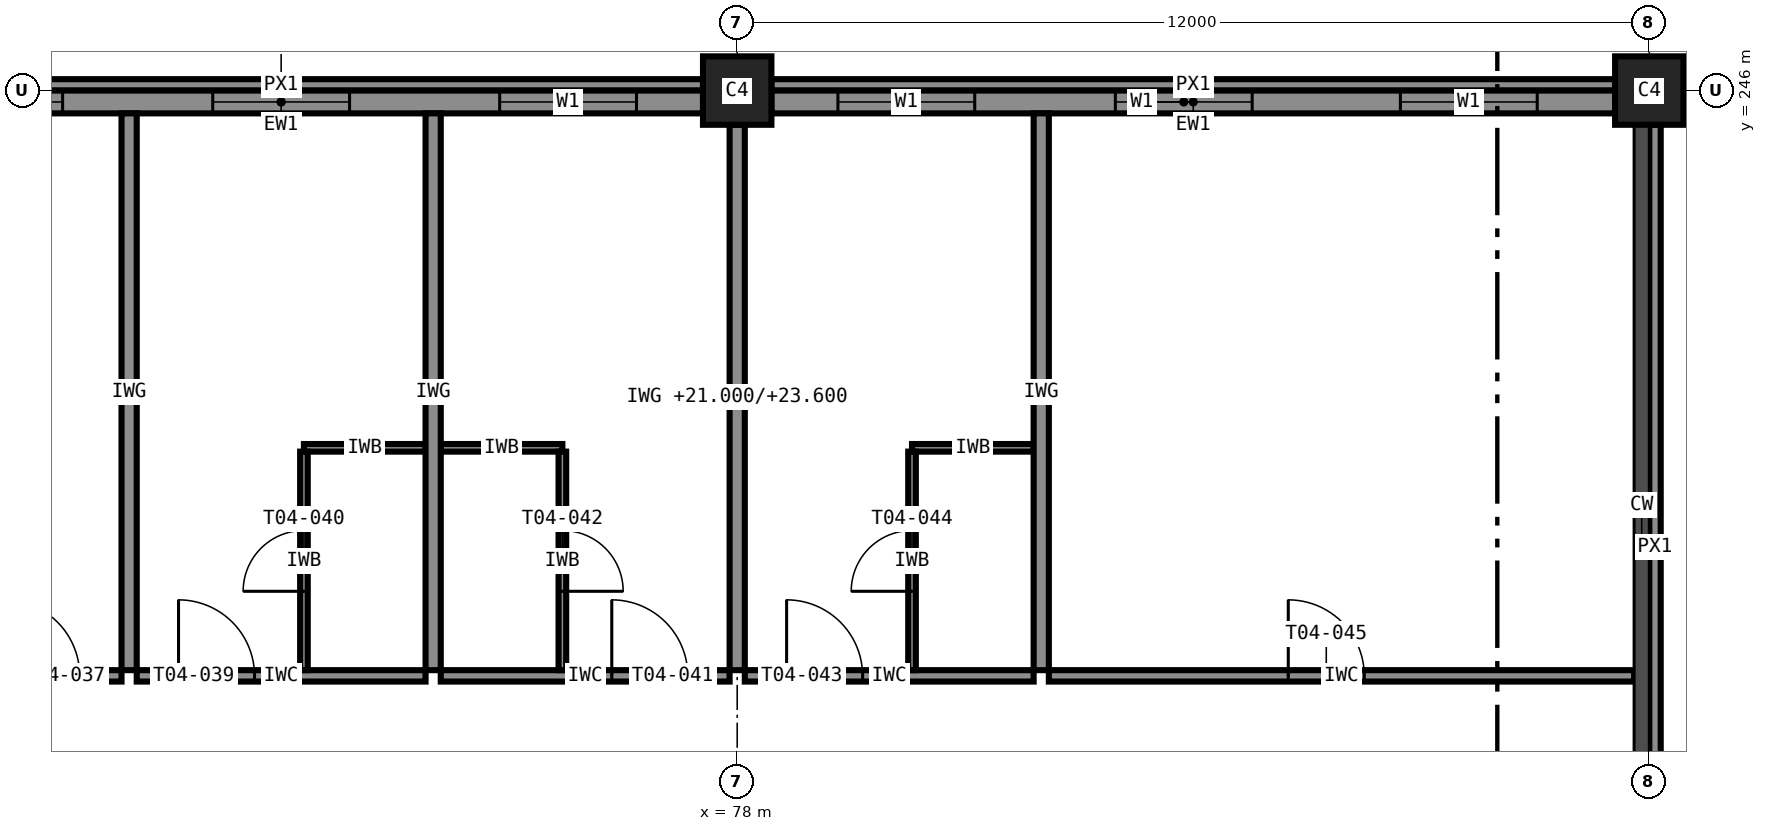
"""IFC4 building model, lengths in metres.
Left out: names, types, materials, properties, quantities, classifications, styles, units other than length and angle.
Written with IfcOpenShell. Run it as: python <this file> out.ifc"""

import sys

from ifc_helpers import new_model, si_unit, direction, frame, frame_2d, origin, origin_2d, place, context, subcontext, project, spatial, rectangle, extrude, element, fill, save


model = new_model("IFC4")
c1 = context("Model", 3, precision=1e-05, world=origin(), true_north=direction((0.0, 1.0)))
c2 = subcontext(c1, "Body", "Model", "MODEL_VIEW")
j1 = project(units=[si_unit("LENGTHUNIT", "METRE"), si_unit("PLANEANGLEUNIT", "RADIAN")], contexts=[c1])
p1 = place(None, origin())
s1 = spatial("IfcSite", under=j1, at=p1, CompositionType="ELEMENT")
p2 = place(p1, origin())
s2 = spatial("IfcBuilding", under=s1, at=p2, CompositionType="ELEMENT")
p3 = place(p2, frame((0.0, 0.0, 21.0)))
s3 = spatial("IfcBuildingStorey", under=s2, at=p3, CompositionType="ELEMENT", Elevation=21.0)
for number, where, z_axis, x_axis in (
    (1, (78.0, 246.0, 0.0), (0.0, 0.0, 1.0), (1.0, 0.0, 0.0)),
    (2, (90.0, 246.0, 0.0), (0.0, 0.0, 1.0), (1.0, 0.0, 0.0)),
):
    element("IfcColumn", number, at=place(p3, frame(where, z_axis=z_axis, x_axis=x_axis)), inside=s3, PredefinedType="COLUMN", context=c2, shape_type="SweptSolid", body=[
        extrude(rectangle(XDim=0.9, YDim=0.9, at=origin_2d()), origin(), (0.0, 0.0, 1.0), 3.6),
    ])
p4 = place(p3, frame((90.075, 234.45, 3.4), z_axis=(0.0, 0.0, 1.0), x_axis=(0.0, 1.0, 0.0)))
e3 = element("IfcWall", 3, at=p4, inside=s3, PredefinedType="STANDARD", context=c2, shape_type="SweptSolid", body=[
    extrude(rectangle(XDim=11.1, YDim=0.15, at=frame_2d((5.55, 0.0))), origin(), (0.0, 0.0, 1.0), 0.2),
])
p5 = place(p3, frame((89.55, 245.85, 0.0), z_axis=(0.0, 0.0, 1.0), x_axis=(-1.0, 0.0, 0.0)))
e4 = element("IfcWall", 4, at=p5, inside=s3, PredefinedType="STANDARD", context=c2, shape_type="SweptSolid", body=[
    extrude(rectangle(XDim=11.1, YDim=0.3, at=frame_2d((5.55, 0.0))), origin(), (0.0, 0.0, 1.0), 2.6),
])
p6 = place(p5, frame((8.425, 0.0, 0.85)))
e5 = element("IfcOpeningElement", 5, at=p6, cuts=e4, PredefinedType="OPENING", context=c2, shape_type="SweptSolid", body=[
    extrude(rectangle(XDim=1.8, YDim=1.75, at=frame_2d((0.9, 0.875))), frame((0.0, 0.16, 0.0), z_axis=(0.0, -1.0, 0.0), x_axis=(1.0, 0.0, 0.0)), (0.0, 0.0, 1.0), 0.32),
])
p7 = place(p5, frame((1.025, 0.0, 0.85)))
e6 = element("IfcOpeningElement", 6, at=p7, cuts=e4, PredefinedType="OPENING", context=c2, shape_type="SweptSolid", body=[
    extrude(rectangle(XDim=1.8, YDim=1.75, at=frame_2d((0.9, 0.875))), frame((0.0, 0.16, 0.0), z_axis=(0.0, -1.0, 0.0), x_axis=(1.0, 0.0, 0.0)), (0.0, 0.0, 1.0), 0.32),
])
p8 = place(p5, frame((4.775, 0.0, 0.85)))
e7 = element("IfcOpeningElement", 7, at=p8, cuts=e4, PredefinedType="OPENING", context=c2, shape_type="SweptSolid", body=[
    extrude(rectangle(XDim=1.8, YDim=1.75, at=frame_2d((0.9, 0.875))), frame((0.0, 0.16, 0.0), z_axis=(0.0, -1.0, 0.0), x_axis=(1.0, 0.0, 0.0)), (0.0, 0.0, 1.0), 0.32),
])
p9 = place(p3, frame((77.55, 245.85, 0.0), z_axis=(0.0, 0.0, 1.0), x_axis=(-1.0, 0.0, 0.0)))
e8 = element("IfcWall", 8, at=p9, inside=s3, PredefinedType="STANDARD", context=c2, shape_type="SweptSolid", body=[
    extrude(rectangle(XDim=11.1, YDim=0.3, at=frame_2d((5.55, 0.0))), origin(), (0.0, 0.0, 1.0), 2.6),
])
p10 = place(p9, frame((8.425, 0.0, 0.85)))
e9 = element("IfcOpeningElement", 9, at=p10, cuts=e8, PredefinedType="OPENING", context=c2, shape_type="SweptSolid", body=[
    extrude(rectangle(XDim=1.8, YDim=1.75, at=frame_2d((0.9, 0.875))), frame((0.0, 0.16, 0.0), z_axis=(0.0, -1.0, 0.0), x_axis=(1.0, 0.0, 0.0)), (0.0, 0.0, 1.0), 0.32),
])
p11 = place(p9, frame((4.65, 0.0, 0.85)))
e10 = element("IfcOpeningElement", 10, at=p11, cuts=e8, PredefinedType="OPENING", context=c2, shape_type="SweptSolid", body=[
    extrude(rectangle(XDim=1.8, YDim=1.75, at=frame_2d((0.9, 0.875))), frame((0.0, 0.16, 0.0), z_axis=(0.0, -1.0, 0.0), x_axis=(1.0, 0.0, 0.0)), (0.0, 0.0, 1.0), 0.32),
])
p12 = place(p9, frame((0.875, 0.0, 0.85)))
e11 = element("IfcOpeningElement", 11, at=p12, cuts=e8, PredefinedType="OPENING", context=c2, shape_type="SweptSolid", body=[
    extrude(rectangle(XDim=1.8, YDim=1.75, at=frame_2d((0.9, 0.875))), frame((0.0, 0.16, 0.0), z_axis=(0.0, -1.0, 0.0), x_axis=(1.0, 0.0, 0.0)), (0.0, 0.0, 1.0), 0.32),
])
for number, where, z_axis, x_axis in (
    (12, (89.55, 246.075, 3.4), (0.0, 0.0, 1.0), (-1.0, 0.0, 0.0)),
    (13, (77.55, 246.075, 3.4), (0.0, 0.0, 1.0), (-1.0, 0.0, 0.0)),
):
    element("IfcWall", number, at=place(p3, frame(where, z_axis=z_axis, x_axis=x_axis)), inside=s3, PredefinedType="STANDARD", context=c2, shape_type="SweptSolid", body=[
        extrude(rectangle(XDim=11.1, YDim=0.15, at=frame_2d((5.55, 0.0))), origin(), (0.0, 0.0, 1.0), 0.2),
    ])
p13 = place(p3, frame((66.1, 238.3, 0.0), z_axis=(0.0, 0.0, 1.0), x_axis=(1.0, 0.0, 0.0)))
e14 = element("IfcWall", 14, at=p13, inside=s3, PredefinedType="PARTITIONING", context=c2, shape_type="SweptSolid", body=[
    extrude(rectangle(XDim=3.8, YDim=0.15, at=frame_2d((1.9, 0.0))), origin(), (0.0, 0.0, 1.0), 3.4),
])
p14 = place(p13, frame((2.25, 0.0, 0.0)))
e15 = element("IfcOpeningElement", 15, at=p14, cuts=e14, PredefinedType="OPENING", context=c2, shape_type="SweptSolid", body=[
    extrude(rectangle(XDim=1.0, YDim=2.1, at=frame_2d((0.5, 1.05))), frame((0.0, 0.085, 0.0), z_axis=(0.0, -1.0, 0.0), x_axis=(1.0, 0.0, 0.0)), (0.0, 0.0, 1.0), 0.17),
])
p15 = place(p3, frame((70.1, 238.3, 0.0), z_axis=(0.0, 0.0, 1.0), x_axis=(1.0, 0.0, 0.0)))
e16 = element("IfcWall", 16, at=p15, inside=s3, PredefinedType="PARTITIONING", context=c2, shape_type="SweptSolid", body=[
    extrude(rectangle(XDim=3.8, YDim=0.15, at=frame_2d((1.9, 0.0))), origin(), (0.0, 0.0, 1.0), 3.4),
])
p16 = place(p15, frame((0.55, 0.0, 0.0)))
e17 = element("IfcOpeningElement", 17, at=p16, cuts=e16, PredefinedType="OPENING", context=c2, shape_type="SweptSolid", body=[
    extrude(rectangle(XDim=1.0, YDim=2.1, at=frame_2d((0.5, 1.05))), frame((0.0, 0.085, 0.0), z_axis=(0.0, -1.0, 0.0), x_axis=(1.0, 0.0, 0.0)), (0.0, 0.0, 1.0), 0.17),
])
p17 = place(p3, frame((72.3, 241.3, 0.0), z_axis=(0.0, 0.0, 1.0), x_axis=(1.0, 0.0, 0.0)))
e18 = element("IfcWall", 18, at=p17, inside=s3, PredefinedType="PARTITIONING", context=c2, shape_type="SweptSolid", body=[
    extrude(rectangle(XDim=1.6, YDim=0.1, at=frame_2d((0.8, 0.0))), origin(), (0.0, 0.0, 1.0), 3.4),
])
p18 = place(p3, frame((72.3, 238.375, 0.0), z_axis=(0.0, 0.0, 1.0), x_axis=(0.0, 1.0, 0.0)))
e19 = element("IfcWall", 19, at=p18, inside=s3, PredefinedType="PARTITIONING", context=c2, shape_type="SweptSolid", body=[
    extrude(rectangle(XDim=2.875, YDim=0.1, at=frame_2d((1.438, 0.0))), origin(), (0.0, 0.0, 1.0), 3.4),
])
p19 = place(p18, frame((1.038, 0.0, 0.0)))
e20 = element("IfcOpeningElement", 20, at=p19, cuts=e19, PredefinedType="OPENING", context=c2, shape_type="SweptSolid", body=[
    extrude(rectangle(XDim=0.8, YDim=2.1, at=frame_2d((0.4, 1.05))), frame((0.0, 0.06, 0.0), z_axis=(0.0, -1.0, 0.0), x_axis=(1.0, 0.0, 0.0)), (0.0, 0.0, 1.0), 0.12),
])
p20 = place(p3, frame((74.1, 238.3, 0.0), z_axis=(0.0, 0.0, 1.0), x_axis=(1.0, 0.0, 0.0)))
e21 = element("IfcWall", 21, at=p20, inside=s3, PredefinedType="PARTITIONING", context=c2, shape_type="SweptSolid", body=[
    extrude(rectangle(XDim=3.8, YDim=0.15, at=frame_2d((1.9, 0.0))), origin(), (0.0, 0.0, 1.0), 3.4),
])
p21 = place(p20, frame((2.25, 0.0, 0.0)))
e22 = element("IfcOpeningElement", 22, at=p21, cuts=e21, PredefinedType="OPENING", context=c2, shape_type="SweptSolid", body=[
    extrude(rectangle(XDim=1.0, YDim=2.1, at=frame_2d((0.5, 1.05))), frame((0.0, 0.085, 0.0), z_axis=(0.0, -1.0, 0.0), x_axis=(1.0, 0.0, 0.0)), (0.0, 0.0, 1.0), 0.17),
])
p22 = place(p3, frame((74.1, 241.3, 0.0), z_axis=(0.0, 0.0, 1.0), x_axis=(1.0, 0.0, 0.0)))
e23 = element("IfcWall", 23, at=p22, inside=s3, PredefinedType="PARTITIONING", context=c2, shape_type="SweptSolid", body=[
    extrude(rectangle(XDim=1.6, YDim=0.1, at=frame_2d((0.8, 0.0))), origin(), (0.0, 0.0, 1.0), 3.4),
])
p23 = place(p3, frame((75.7, 241.25, 0.0), z_axis=(0.0, 0.0, 1.0), x_axis=(0.0, -1.0, 0.0)))
e24 = element("IfcWall", 24, at=p23, inside=s3, PredefinedType="PARTITIONING", context=c2, shape_type="SweptSolid", body=[
    extrude(rectangle(XDim=2.875, YDim=0.1, at=frame_2d((1.438, 0.0))), origin(), (0.0, 0.0, 1.0), 3.4),
])
p24 = place(p23, frame((1.038, 0.0, 0.0)))
e25 = element("IfcOpeningElement", 25, at=p24, cuts=e24, PredefinedType="OPENING", context=c2, shape_type="SweptSolid", body=[
    extrude(rectangle(XDim=0.8, YDim=2.1, at=frame_2d((0.4, 1.05))), frame((0.0, 0.06, 0.0), z_axis=(0.0, -1.0, 0.0), x_axis=(1.0, 0.0, 0.0)), (0.0, 0.0, 1.0), 0.12),
])
p25 = place(p3, frame((78.1, 238.3, 0.0), z_axis=(0.0, 0.0, 1.0), x_axis=(1.0, 0.0, 0.0)))
e26 = element("IfcWall", 26, at=p25, inside=s3, PredefinedType="PARTITIONING", context=c2, shape_type="SweptSolid", body=[
    extrude(rectangle(XDim=3.8, YDim=0.15, at=frame_2d((1.9, 0.0))), origin(), (0.0, 0.0, 1.0), 3.4),
])
p26 = place(p25, frame((0.55, 0.0, 0.0)))
e27 = element("IfcOpeningElement", 27, at=p26, cuts=e26, PredefinedType="OPENING", context=c2, shape_type="SweptSolid", body=[
    extrude(rectangle(XDim=1.0, YDim=2.1, at=frame_2d((0.5, 1.05))), frame((0.0, 0.085, 0.0), z_axis=(0.0, -1.0, 0.0), x_axis=(1.0, 0.0, 0.0)), (0.0, 0.0, 1.0), 0.17),
])
p27 = place(p3, frame((80.3, 241.3, 0.0), z_axis=(0.0, 0.0, 1.0), x_axis=(1.0, 0.0, 0.0)))
e28 = element("IfcWall", 28, at=p27, inside=s3, PredefinedType="PARTITIONING", context=c2, shape_type="SweptSolid", body=[
    extrude(rectangle(XDim=1.6, YDim=0.1, at=frame_2d((0.8, 0.0))), origin(), (0.0, 0.0, 1.0), 3.4),
])
p28 = place(p3, frame((80.3, 238.375, 0.0), z_axis=(0.0, 0.0, 1.0), x_axis=(0.0, 1.0, 0.0)))
e29 = element("IfcWall", 29, at=p28, inside=s3, PredefinedType="PARTITIONING", context=c2, shape_type="SweptSolid", body=[
    extrude(rectangle(XDim=2.875, YDim=0.1, at=frame_2d((1.438, 0.0))), origin(), (0.0, 0.0, 1.0), 3.4),
])
p29 = place(p28, frame((1.038, 0.0, 0.0)))
e30 = element("IfcOpeningElement", 30, at=p29, cuts=e29, PredefinedType="OPENING", context=c2, shape_type="SweptSolid", body=[
    extrude(rectangle(XDim=0.8, YDim=2.1, at=frame_2d((0.4, 1.05))), frame((0.0, 0.06, 0.0), z_axis=(0.0, -1.0, 0.0), x_axis=(1.0, 0.0, 0.0)), (0.0, 0.0, 1.0), 0.12),
])
p30 = place(p3, frame((82.1, 238.3, 0.0), z_axis=(0.0, 0.0, 1.0), x_axis=(1.0, 0.0, 0.0)))
e31 = element("IfcWall", 31, at=p30, inside=s3, PredefinedType="PARTITIONING", context=c2, shape_type="SweptSolid", body=[
    extrude(rectangle(XDim=7.7, YDim=0.15, at=frame_2d((3.85, 0.0))), origin(), (0.0, 0.0, 1.0), 3.4),
])
p31 = place(p30, frame((3.15, 0.0, 0.0)))
e32 = element("IfcOpeningElement", 32, at=p31, cuts=e31, PredefinedType="OPENING", context=c2, shape_type="SweptSolid", body=[
    extrude(rectangle(XDim=1.0, YDim=2.1, at=frame_2d((0.5, 1.05))), frame((0.0, 0.085, 0.0), z_axis=(0.0, -1.0, 0.0), x_axis=(1.0, 0.0, 0.0)), (0.0, 0.0, 1.0), 0.17),
])
for number, where, z_axis, x_axis in (
    (33, (70.0, 245.7, 0.0), (0.0, 0.0, 1.0), (0.0, -1.0, 0.0)),
    (34, (74.0, 245.7, 0.0), (0.0, 0.0, 1.0), (0.0, -1.0, 0.0)),
):
    element("IfcWall", number, at=place(p3, frame(where, z_axis=z_axis, x_axis=x_axis)), inside=s3, PredefinedType="PARTITIONING", context=c2, shape_type="SweptSolid", body=[
        extrude(rectangle(XDim=7.325, YDim=0.2, at=frame_2d((3.663, 0.0))), origin(), (0.0, 0.0, 1.0), 3.4),
    ])
p32 = place(p3, frame((78.0, 245.55, 0.0), z_axis=(0.0, 0.0, 1.0), x_axis=(0.0, -1.0, 0.0)))
e35 = element("IfcWall", 35, at=p32, inside=s3, PredefinedType="PARTITIONING", context=c2, shape_type="SweptSolid", body=[
    extrude(rectangle(XDim=7.175, YDim=0.2, at=frame_2d((3.587, 0.0))), origin(), (0.0, 0.0, 1.0), 2.6),
])
p33 = place(p3, frame((82.0, 245.7, 0.0), z_axis=(0.0, 0.0, 1.0), x_axis=(0.0, -1.0, 0.0)))
e36 = element("IfcWall", 36, at=p33, inside=s3, PredefinedType="PARTITIONING", context=c2, shape_type="SweptSolid", body=[
    extrude(rectangle(XDim=7.325, YDim=0.2, at=frame_2d((3.663, 0.0))), origin(), (0.0, 0.0, 1.0), 3.4),
])
p34 = place(p6, origin())
e37 = element("IfcWindow", 37, at=p34, inside=s3, PartitioningType="SINGLE_PANEL", PredefinedType="WINDOW", context=c2, shape_type="SweptSolid", body=[
    extrude(rectangle(XDim=1.8, YDim=1.75, at=frame_2d((0.9, 0.875))), frame((0.0, 0.03, 0.0), z_axis=(0.0, -1.0, 0.0), x_axis=(1.0, 0.0, 0.0)), (0.0, 0.0, 1.0), 0.06),
])
fill(e5, e37)
p35 = place(p7, origin())
e38 = element("IfcWindow", 38, at=p35, inside=s3, PartitioningType="SINGLE_PANEL", PredefinedType="WINDOW", context=c2, shape_type="SweptSolid", body=[
    extrude(rectangle(XDim=1.8, YDim=1.75, at=frame_2d((0.9, 0.875))), frame((0.0, 0.03, 0.0), z_axis=(0.0, -1.0, 0.0), x_axis=(1.0, 0.0, 0.0)), (0.0, 0.0, 1.0), 0.06),
])
fill(e6, e38)
p36 = place(p8, origin())
e39 = element("IfcWindow", 39, at=p36, inside=s3, PartitioningType="SINGLE_PANEL", PredefinedType="WINDOW", context=c2, shape_type="SweptSolid", body=[
    extrude(rectangle(XDim=1.8, YDim=1.75, at=frame_2d((0.9, 0.875))), frame((0.0, 0.03, 0.0), z_axis=(0.0, -1.0, 0.0), x_axis=(1.0, 0.0, 0.0)), (0.0, 0.0, 1.0), 0.06),
])
fill(e7, e39)
p37 = place(p10, origin())
e40 = element("IfcWindow", 40, at=p37, inside=s3, PartitioningType="SINGLE_PANEL", PredefinedType="WINDOW", context=c2, shape_type="SweptSolid", body=[
    extrude(rectangle(XDim=1.8, YDim=1.75, at=frame_2d((0.9, 0.875))), frame((0.0, 0.03, 0.0), z_axis=(0.0, -1.0, 0.0), x_axis=(1.0, 0.0, 0.0)), (0.0, 0.0, 1.0), 0.06),
])
fill(e9, e40)
p38 = place(p11, origin())
e41 = element("IfcWindow", 41, at=p38, inside=s3, PartitioningType="SINGLE_PANEL", PredefinedType="WINDOW", context=c2, shape_type="SweptSolid", body=[
    extrude(rectangle(XDim=1.8, YDim=1.75, at=frame_2d((0.9, 0.875))), frame((0.0, 0.03, 0.0), z_axis=(0.0, -1.0, 0.0), x_axis=(1.0, 0.0, 0.0)), (0.0, 0.0, 1.0), 0.06),
])
fill(e10, e41)
p39 = place(p12, origin())
e42 = element("IfcWindow", 42, at=p39, inside=s3, PartitioningType="SINGLE_PANEL", PredefinedType="WINDOW", context=c2, shape_type="SweptSolid", body=[
    extrude(rectangle(XDim=1.8, YDim=1.75, at=frame_2d((0.9, 0.875))), frame((0.0, 0.03, 0.0), z_axis=(0.0, -1.0, 0.0), x_axis=(1.0, 0.0, 0.0)), (0.0, 0.0, 1.0), 0.06),
])
fill(e11, e42)
p40 = place(p14, origin())
e43 = element("IfcDoor", 43, at=p40, inside=s3, OperationType="SINGLE_SWING_LEFT", PredefinedType="DOOR", context=c2, shape_type="SweptSolid", body=[
    extrude(rectangle(XDim=1.0, YDim=2.1, at=frame_2d((0.5, 1.05))), frame((0.0, 0.025, 0.0), z_axis=(0.0, -1.0, 0.0), x_axis=(1.0, 0.0, 0.0)), (0.0, 0.0, 1.0), 0.05),
])
fill(e15, e43)
p41 = place(p16, origin())
e44 = element("IfcDoor", 44, at=p41, inside=s3, OperationType="SINGLE_SWING_LEFT", PredefinedType="DOOR", context=c2, shape_type="SweptSolid", body=[
    extrude(rectangle(XDim=1.0, YDim=2.1, at=frame_2d((0.5, 1.05))), frame((0.0, 0.025, 0.0), z_axis=(0.0, -1.0, 0.0), x_axis=(1.0, 0.0, 0.0)), (0.0, 0.0, 1.0), 0.05),
])
fill(e17, e44)
p42 = place(p19, origin())
e45 = element("IfcDoor", 45, at=p42, inside=s3, OperationType="SINGLE_SWING_LEFT", PredefinedType="DOOR", context=c2, shape_type="SweptSolid", body=[
    extrude(rectangle(XDim=0.8, YDim=2.1, at=frame_2d((0.4, 1.05))), frame((0.0, 0.025, 0.0), z_axis=(0.0, -1.0, 0.0), x_axis=(1.0, 0.0, 0.0)), (0.0, 0.0, 1.0), 0.05),
])
fill(e20, e45)
p43 = place(p21, origin())
e46 = element("IfcDoor", 46, at=p43, inside=s3, OperationType="SINGLE_SWING_LEFT", PredefinedType="DOOR", context=c2, shape_type="SweptSolid", body=[
    extrude(rectangle(XDim=1.0, YDim=2.1, at=frame_2d((0.5, 1.05))), frame((0.0, 0.025, 0.0), z_axis=(0.0, -1.0, 0.0), x_axis=(1.0, 0.0, 0.0)), (0.0, 0.0, 1.0), 0.05),
])
fill(e22, e46)
p44 = place(p24, origin())
e47 = element("IfcDoor", 47, at=p44, inside=s3, OperationType="SINGLE_SWING_RIGHT", PredefinedType="DOOR", context=c2, shape_type="SweptSolid", body=[
    extrude(rectangle(XDim=0.8, YDim=2.1, at=frame_2d((0.4, 1.05))), frame((0.0, 0.025, 0.0), z_axis=(0.0, -1.0, 0.0), x_axis=(1.0, 0.0, 0.0)), (0.0, 0.0, 1.0), 0.05),
])
fill(e25, e47)
p45 = place(p26, origin())
e48 = element("IfcDoor", 48, at=p45, inside=s3, OperationType="SINGLE_SWING_LEFT", PredefinedType="DOOR", context=c2, shape_type="SweptSolid", body=[
    extrude(rectangle(XDim=1.0, YDim=2.1, at=frame_2d((0.5, 1.05))), frame((0.0, 0.025, 0.0), z_axis=(0.0, -1.0, 0.0), x_axis=(1.0, 0.0, 0.0)), (0.0, 0.0, 1.0), 0.05),
])
fill(e27, e48)
p46 = place(p29, origin())
e49 = element("IfcDoor", 49, at=p46, inside=s3, OperationType="SINGLE_SWING_LEFT", PredefinedType="DOOR", context=c2, shape_type="SweptSolid", body=[
    extrude(rectangle(XDim=0.8, YDim=2.1, at=frame_2d((0.4, 1.05))), frame((0.0, 0.025, 0.0), z_axis=(0.0, -1.0, 0.0), x_axis=(1.0, 0.0, 0.0)), (0.0, 0.0, 1.0), 0.05),
])
fill(e30, e49)
p47 = place(p31, origin())
e50 = element("IfcDoor", 50, at=p47, inside=s3, OperationType="SINGLE_SWING_LEFT", PredefinedType="DOOR", context=c2, shape_type="SweptSolid", body=[
    extrude(rectangle(XDim=1.0, YDim=2.1, at=frame_2d((0.5, 1.05))), frame((0.0, 0.025, 0.0), z_axis=(0.0, -1.0, 0.0), x_axis=(1.0, 0.0, 0.0)), (0.0, 0.0, 1.0), 0.05),
])
fill(e32, e50)
save(model, sys.argv[1])
